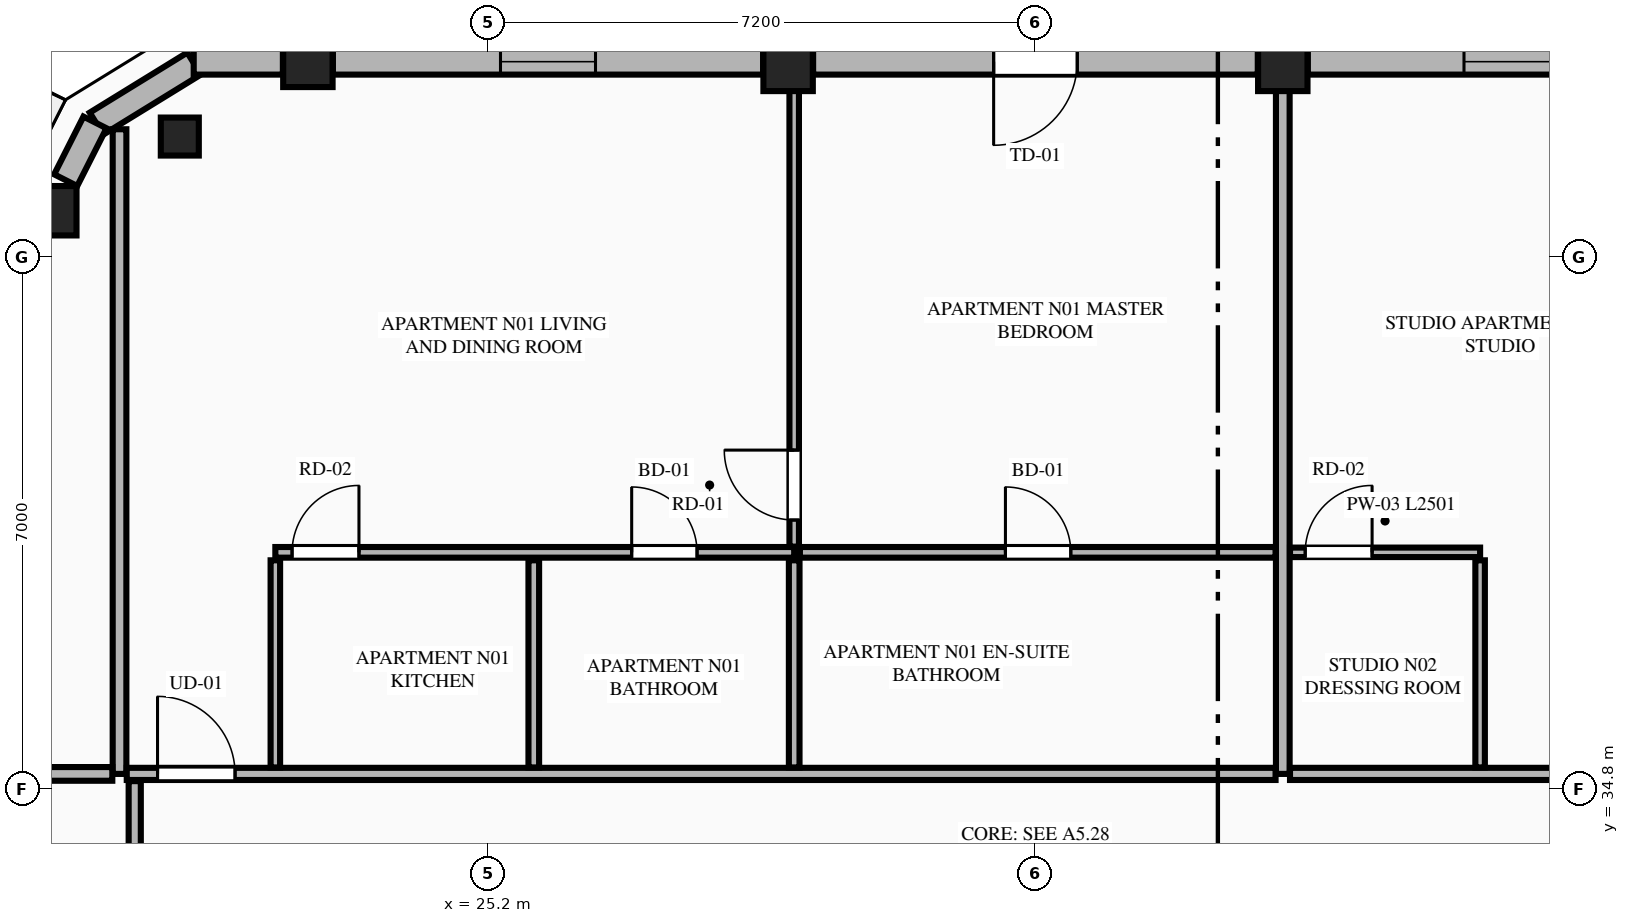
"""IFC4 building model, lengths in metres.
Left out: names, types, materials, properties, quantities, classifications, styles, units other than length and angle.
Written with IfcOpenShell. Run it as: python <this file> out.ifc"""

import sys

from ifc_helpers import new_model, si_unit, direction, frame, frame_2d, origin, origin_2d, place, context, subcontext, project, spatial, rectangle, extrude, element, fill, save


model = new_model("IFC4")
c1 = context("Model", 3, precision=1e-05, world=origin(), true_north=direction((0.0, 1.0)))
c2 = subcontext(c1, "Body", "Model", "MODEL_VIEW")
j1 = project(units=[si_unit("LENGTHUNIT", "METRE"), si_unit("PLANEANGLEUNIT", "RADIAN")], contexts=[c1])
p1 = place(None, origin())
s1 = spatial("IfcSite", under=j1, at=p1, CompositionType="ELEMENT")
p2 = place(p1, origin())
s2 = spatial("IfcBuilding", under=s1, at=p2, CompositionType="ELEMENT")
p3 = place(p2, frame((0.0, 0.0, 270.8)))
s3 = spatial("IfcBuildingStorey", under=s2, at=p3, CompositionType="ELEMENT", Elevation=270.8)
for number, where, z_axis, x_axis in (
    (1, (35.654, 44.308, 0.0), (0.0, 0.0, 1.0), (1.0, 0.0, 0.0)),
    (2, (29.146, 44.308, 0.0), (0.0, 0.0, 1.0), (1.0, 0.0, 0.0)),
    (3, (22.828, 44.361, 0.0), (0.0, 0.0, 1.0), (1.0, 0.0, 0.0)),
    (4, (19.459, 42.409, 0.0), (0.0, 0.0, 1.0), (1.0, 0.0, 0.0)),
):
    element("IfcColumn", number, at=place(p3, frame(where, z_axis=z_axis, x_axis=x_axis)), inside=s3, PredefinedType="COLUMN", context=c2, shape_type="SweptSolid", body=[
        extrude(rectangle(XDim=0.65, YDim=0.65, at=origin_2d()), origin(), (0.0, 0.0, 1.0), 3.65),
    ])
p4 = place(p3, frame((21.143, 43.385, 0.0), z_axis=(0.0, 0.0, 1.0), x_axis=(-0.865256437757, -0.501329529272, 0.0)))
e5 = element("IfcColumn", 5, at=p4, inside=s3, PredefinedType="PILASTER", context=c2, shape_type="SweptSolid", body=[
    extrude(rectangle(XDim=0.5, YDim=0.35, at=origin_2d()), origin(), (0.0, 0.0, 1.0), 3.65),
])
p5 = place(p3, frame((21.331, 44.345, 0.0), z_axis=(0.0, 0.0, 1.0), x_axis=(-0.851680557619, -0.52406128246, 0.0)))
e6 = element("IfcWall", 6, at=p5, inside=s3, PredefinedType="STANDARD", context=c2, shape_type="SweptSolid", body=[
    extrude(rectangle(XDim=1.508, YDim=0.34, at=frame_2d((0.754, 0.0))), origin(), (0.0, 0.0, 1.0), 3.45),
])
p6 = place(p3, frame((41.643, 44.37, 0.0), z_axis=(0.0, 0.0, 1.0), x_axis=(-1.0, 0.0, 0.0)))
e7 = element("IfcWall", 7, at=p6, inside=s3, PredefinedType="STANDARD", context=c2, shape_type="SweptSolid", body=[
    extrude(rectangle(XDim=5.66, YDim=0.34, at=frame_2d((2.83, 0.0))), origin(), (0.0, 0.0, 1.0), 2.983),
])
p7 = place(p6, frame((2.055, 0.0, 0.75)))
e8 = element("IfcOpeningElement", 8, at=p7, cuts=e7, PredefinedType="OPENING", context=c2, shape_type="SweptSolid", body=[
    extrude(rectangle(XDim=1.55, YDim=2.05, at=frame_2d((0.775, 1.025))), frame((0.0, 0.18, 0.0), z_axis=(0.0, -1.0, 0.0), x_axis=(1.0, 0.0, 0.0)), (0.0, 0.0, 1.0), 0.36),
])
p8 = place(p3, frame((35.325, 44.37, 0.0), z_axis=(0.0, 0.0, 1.0), x_axis=(-1.0, 0.0, 0.0)))
e9 = element("IfcWall", 9, at=p8, inside=s3, PredefinedType="STANDARD", context=c2, shape_type="SweptSolid", body=[
    extrude(rectangle(XDim=5.85, YDim=0.34, at=frame_2d((2.925, 0.0))), origin(), (0.0, 0.0, 1.0), 2.983),
])
p9 = place(p8, frame((2.375, 0.0, 0.0)))
e10 = element("IfcOpeningElement", 10, at=p9, cuts=e9, PredefinedType="OPENING", context=c2, shape_type="SweptSolid", body=[
    extrude(rectangle(XDim=1.1, YDim=2.25, at=frame_2d((0.55, 1.125))), frame((0.0, 0.18, 0.0), z_axis=(0.0, -1.0, 0.0), x_axis=(1.0, 0.0, 0.0)), (0.0, 0.0, 1.0), 0.36),
])
p10 = place(p3, frame((28.817, 44.37, 0.0), z_axis=(0.0, 0.0, 1.0), x_axis=(-1.0, 0.0, 0.0)))
e11 = element("IfcWall", 11, at=p10, inside=s3, PredefinedType="STANDARD", context=c2, shape_type="SweptSolid", body=[
    extrude(rectangle(XDim=5.66, YDim=0.34, at=frame_2d((2.83, 0.0))), origin(), (0.0, 0.0, 1.0), 2.983),
])
p11 = place(p10, frame((2.205, 0.0, 0.75)))
e12 = element("IfcOpeningElement", 12, at=p11, cuts=e11, PredefinedType="OPENING", context=c2, shape_type="SweptSolid", body=[
    extrude(rectangle(XDim=1.25, YDim=1.95, at=frame_2d((0.625, 0.975))), frame((0.0, 0.18, 0.0), z_axis=(0.0, -1.0, 0.0), x_axis=(1.0, 0.0, 0.0)), (0.0, 0.0, 1.0), 0.36),
])
p12 = place(p3, frame((22.499, 44.37, 0.0), z_axis=(0.0, 0.0, 1.0), x_axis=(-1.0, 0.0, 0.0)))
e13 = element("IfcWall", 13, at=p12, inside=s3, PredefinedType="STANDARD", context=c2, shape_type="SweptSolid", body=[
    extrude(rectangle(XDim=1.173, YDim=0.34, at=frame_2d((0.586, 0.0))), origin(), (0.0, 0.0, 1.0), 3.45),
])
p13 = place(p3, frame((20.027, 43.571, 0.0), z_axis=(0.0, 0.0, 1.0), x_axis=(-0.451907025977, -0.8920650424, 0.0)))
e14 = element("IfcWall", 14, at=p13, inside=s3, PredefinedType="STANDARD", context=c2, shape_type="SweptSolid", body=[
    extrude(rectangle(XDim=0.852, YDim=0.34, at=frame_2d((0.426, 0.0))), origin(), (0.0, 0.0, 1.0), 3.45),
])
p14 = place(p3, frame((20.35, 35.0, 0.0), z_axis=(0.0, 0.0, 1.0), x_axis=(0.0, 1.0, 0.0)))
e15 = element("IfcWall", 15, at=p14, inside=s3, PredefinedType="PARTITIONING", context=c2, shape_type="SweptSolid", body=[
    extrude(rectangle(XDim=8.481, YDim=0.18, at=frame_2d((4.24, 0.0))), origin(), (0.0, 0.0, 1.0), 3.45),
])
p15 = place(p3, frame((35.654, 35.0, 0.0), z_axis=(0.0, 0.0, 1.0), x_axis=(0.0, 1.0, 0.0)))
e16 = element("IfcWall", 16, at=p15, inside=s3, PredefinedType="PARTITIONING", context=c2, shape_type="SweptSolid", body=[
    extrude(rectangle(XDim=9.195, YDim=0.18, at=frame_2d((4.598, 0.0))), origin(), (0.0, 0.0, 1.0), 2.907),
])
p16 = place(p3, frame((20.445, 35.0, 0.0), z_axis=(0.0, 0.0, 1.0), x_axis=(1.0, 0.0, 0.0)))
e17 = element("IfcWall", 17, at=p16, inside=s3, PredefinedType="PARTITIONING", context=c2, shape_type="SweptSolid", body=[
    extrude(rectangle(XDim=15.114, YDim=0.16, at=frame_2d((7.557, 0.0))), origin(), (0.0, 0.0, 1.0), 3.45),
])
p17 = place(p16, frame((0.405, 0.0, 0.0)))
e18 = element("IfcOpeningElement", 18, at=p17, cuts=e17, PredefinedType="OPENING", context=c2, shape_type="SweptSolid", body=[
    extrude(rectangle(XDim=1.02, YDim=2.25, at=frame_2d((0.51, 1.125))), frame((0.0, 0.09, 0.0), z_axis=(0.0, -1.0, 0.0), x_axis=(1.0, 0.0, 0.0)), (0.0, 0.0, 1.0), 0.18),
])
p18 = place(p3, frame((22.4, 35.085, 0.0), z_axis=(0.0, 0.0, 1.0), x_axis=(0.0, 1.0, 0.0)))
e19 = element("IfcWall", 19, at=p18, inside=s3, PredefinedType="PARTITIONING", context=c2, shape_type="SweptSolid", body=[
    extrude(rectangle(XDim=2.725, YDim=0.125, at=frame_2d((1.363, 0.0))), origin(), (0.0, 0.0, 1.0), 3.45),
])
p19 = place(p3, frame((22.4, 37.915, 0.0), z_axis=(0.0, 0.0, 1.0), x_axis=(1.0, 0.0, 0.0)))
e20 = element("IfcWall", 20, at=p19, inside=s3, PredefinedType="PLUMBINGWALL", context=c2, shape_type="SweptSolid", body=[
    extrude(rectangle(XDim=6.826, YDim=0.14, at=frame_2d((3.413, 0.0))), origin(), (0.0, 0.0, 1.0), 3.45),
])
p20 = place(p19, frame((4.688, 0.0, 0.0)))
e21 = element("IfcOpeningElement", 21, at=p20, cuts=e20, PredefinedType="OPENING", context=c2, shape_type="SweptSolid", body=[
    extrude(rectangle(XDim=0.86, YDim=2.1, at=frame_2d((0.43, 1.05))), frame((0.0, 0.08, 0.0), z_axis=(0.0, -1.0, 0.0), x_axis=(1.0, 0.0, 0.0)), (0.0, 0.0, 1.0), 0.16),
])
p21 = place(p19, frame((0.22, 0.0, 0.0)))
e22 = element("IfcOpeningElement", 22, at=p21, cuts=e20, PredefinedType="OPENING", context=c2, shape_type="SweptSolid", body=[
    extrude(rectangle(XDim=0.88, YDim=2.15, at=frame_2d((0.44, 1.075))), frame((0.0, 0.08, 0.0), z_axis=(0.0, -1.0, 0.0), x_axis=(1.0, 0.0, 0.0)), (0.0, 0.0, 1.0), 0.16),
])
p22 = place(p3, frame((29.301, 37.915, 0.0), z_axis=(0.0, 0.0, 1.0), x_axis=(1.0, 0.0, 0.0)))
e23 = element("IfcWall", 23, at=p22, inside=s3, PredefinedType="PLUMBINGWALL", context=c2, shape_type="SweptSolid", body=[
    extrude(rectangle(XDim=6.258, YDim=0.14, at=frame_2d((3.129, 0.0))), origin(), (0.0, 0.0, 1.0), 3.45),
])
p23 = place(p22, frame((2.704, 0.0, 0.0)))
e24 = element("IfcOpeningElement", 24, at=p23, cuts=e23, PredefinedType="OPENING", context=c2, shape_type="SweptSolid", body=[
    extrude(rectangle(XDim=0.86, YDim=2.1, at=frame_2d((0.43, 1.05))), frame((0.0, 0.08, 0.0), z_axis=(0.0, -1.0, 0.0), x_axis=(1.0, 0.0, 0.0)), (0.0, 0.0, 1.0), 0.16),
])
p24 = place(p3, frame((25.8, 35.085, 0.0), z_axis=(0.0, 0.0, 1.0), x_axis=(0.0, 1.0, 0.0)))
e25 = element("IfcWall", 25, at=p24, inside=s3, PredefinedType="PLUMBINGWALL", context=c2, shape_type="SweptSolid", body=[
    extrude(rectangle(XDim=2.725, YDim=0.14, at=frame_2d((1.363, 0.0))), origin(), (0.0, 0.0, 1.0), 3.45),
])
p25 = place(p3, frame((29.226, 35.085, 0.0), z_axis=(0.0, 0.0, 1.0), x_axis=(0.0, 1.0, 0.0)))
e26 = element("IfcWall", 26, at=p25, inside=s3, PredefinedType="PLUMBINGWALL", context=c2, shape_type="SweptSolid", body=[
    extrude(rectangle(XDim=2.725, YDim=0.14, at=frame_2d((1.363, 0.0))), origin(), (0.0, 0.0, 1.0), 2.907),
])
p26 = place(p3, frame((29.226, 37.99, 0.0), z_axis=(0.0, 0.0, 1.0), x_axis=(0.0, 1.0, 0.0)))
e27 = element("IfcWall", 27, at=p26, inside=s3, PredefinedType="PARTITIONING", context=c2, shape_type="SweptSolid", body=[
    extrude(rectangle(XDim=6.295, YDim=0.125, at=frame_2d((3.147, 0.0))), origin(), (0.0, 0.0, 1.0), 2.907),
])
p27 = place(p26, frame((0.35, 0.0, 0.0)))
e28 = element("IfcOpeningElement", 28, at=p27, cuts=e27, PredefinedType="OPENING", context=c2, shape_type="SweptSolid", body=[
    extrude(rectangle(XDim=0.92, YDim=2.15, at=frame_2d((0.46, 1.075))), frame((0.0, 0.073, 0.0), z_axis=(0.0, -1.0, 0.0), x_axis=(1.0, 0.0, 0.0)), (0.0, 0.0, 1.0), 0.145),
])
p28 = place(p3, frame((35.749, 35.0, 0.0), z_axis=(0.0, 0.0, 1.0), x_axis=(1.0, 0.0, 0.0)))
e29 = element("IfcWall", 29, at=p28, inside=s3, PredefinedType="PARTITIONING", context=c2, shape_type="SweptSolid", body=[
    extrude(rectangle(XDim=8.606, YDim=0.16, at=frame_2d((4.303, 0.0))), origin(), (0.0, 0.0, 1.0), 3.45),
])
p29 = place(p28, frame((6.351, 0.0, 0.0)))
e30 = element("IfcOpeningElement", 30, at=p29, cuts=e29, PredefinedType="OPENING", context=c2, shape_type="SweptSolid", body=[
    extrude(rectangle(XDim=1.02, YDim=2.25, at=frame_2d((0.51, 1.125))), frame((0.0, 0.09, 0.0), z_axis=(0.0, -1.0, 0.0), x_axis=(1.0, 0.0, 0.0)), (0.0, 0.0, 1.0), 0.18),
])
p30 = place(p3, frame((38.25, 35.085, 0.0), z_axis=(0.0, 0.0, 1.0), x_axis=(0.0, 1.0, 0.0)))
e31 = element("IfcWall", 31, at=p30, inside=s3, PredefinedType="PARTITIONING", context=c2, shape_type="SweptSolid", body=[
    extrude(rectangle(XDim=2.725, YDim=0.125, at=frame_2d((1.363, 0.0))), origin(), (0.0, 0.0, 1.0), 3.45),
])
p31 = place(p3, frame((35.749, 37.915, 0.0), z_axis=(0.0, 0.0, 1.0), x_axis=(1.0, 0.0, 0.0)))
e32 = element("IfcWall", 32, at=p31, inside=s3, PredefinedType="PARTITIONING", context=c2, shape_type="SweptSolid", body=[
    extrude(rectangle(XDim=2.501, YDim=0.125, at=frame_2d((1.25, 0.0))), origin(), (0.0, 0.0, 1.0), 3.45),
])
p32 = place(p31, frame((0.2, 0.0, 0.0)))
e33 = element("IfcOpeningElement", 33, at=p32, cuts=e32, PredefinedType="OPENING", context=c2, shape_type="SweptSolid", body=[
    extrude(rectangle(XDim=0.88, YDim=2.15, at=frame_2d((0.44, 1.075))), frame((0.0, 0.073, 0.0), z_axis=(0.0, -1.0, 0.0), x_axis=(1.0, 0.0, 0.0)), (0.0, 0.0, 1.0), 0.145),
])
p33 = place(p3, frame((15.933, 35.0, 0.0), z_axis=(0.0, 0.0, 1.0), x_axis=(1.0, 0.0, 0.0)))
e34 = element("IfcWall", 34, at=p33, inside=s3, PredefinedType="PARTITIONING", context=c2, shape_type="SweptSolid", body=[
    extrude(rectangle(XDim=4.322, YDim=0.18, at=frame_2d((2.161, 0.0))), origin(), (0.0, 0.0, 1.0), 3.45),
])
p34 = place(p3, frame((20.55, 16.495, 0.0), z_axis=(0.0, 0.0, 1.0), x_axis=(0.0, 1.0, 0.0)))
e35 = element("IfcWall", 35, at=p34, inside=s3, PredefinedType="PARTITIONING", context=c2, shape_type="SweptSolid", body=[
    extrude(rectangle(XDim=18.41, YDim=0.16, at=frame_2d((9.205, 0.0))), origin(), (0.0, 0.0, 1.0), 3.137),
])
p35 = place(p34, frame((0.45, 0.0, 0.0)))
e36 = element("IfcOpeningElement", 36, at=p35, cuts=e35, PredefinedType="OPENING", context=c2, shape_type="SweptSolid", body=[
    extrude(rectangle(XDim=1.02, YDim=2.25, at=frame_2d((0.51, 1.125))), frame((0.0, 0.09, 0.0), z_axis=(0.0, -1.0, 0.0), x_axis=(1.0, 0.0, 0.0)), (0.0, 0.0, 1.0), 0.18),
])
p36 = place(p7, origin())
e37 = element("IfcWindow", 37, at=p36, inside=s3, PartitioningType="SINGLE_PANEL", PredefinedType="WINDOW", context=c2, shape_type="SweptSolid", body=[
    extrude(rectangle(XDim=1.55, YDim=2.05, at=frame_2d((0.775, 1.025))), frame((0.0, 0.03, 0.0), z_axis=(0.0, -1.0, 0.0), x_axis=(1.0, 0.0, 0.0)), (0.0, 0.0, 1.0), 0.06),
])
fill(e8, e37)
p37 = place(p9, origin())
e38 = element("IfcDoor", 38, at=p37, inside=s3, OperationType="SINGLE_SWING_RIGHT", PredefinedType="DOOR", context=c2, shape_type="SweptSolid", body=[
    extrude(rectangle(XDim=1.1, YDim=2.25, at=frame_2d((0.55, 1.125))), frame((0.0, 0.025, 0.0), z_axis=(0.0, -1.0, 0.0), x_axis=(1.0, 0.0, 0.0)), (0.0, 0.0, 1.0), 0.05),
])
fill(e10, e38)
p38 = place(p11, origin())
e39 = element("IfcWindow", 39, at=p38, inside=s3, PartitioningType="SINGLE_PANEL", PredefinedType="WINDOW", context=c2, shape_type="SweptSolid", body=[
    extrude(rectangle(XDim=1.25, YDim=1.95, at=frame_2d((0.625, 0.975))), frame((0.0, 0.03, 0.0), z_axis=(0.0, -1.0, 0.0), x_axis=(1.0, 0.0, 0.0)), (0.0, 0.0, 1.0), 0.06),
])
fill(e12, e39)
p39 = place(p20, origin())
e40 = element("IfcDoor", 40, at=p39, inside=s3, OperationType="SINGLE_SWING_LEFT", PredefinedType="DOOR", context=c2, shape_type="SweptSolid", body=[
    extrude(rectangle(XDim=0.86, YDim=2.1, at=frame_2d((0.43, 1.05))), frame((0.0, 0.025, 0.0), z_axis=(0.0, -1.0, 0.0), x_axis=(1.0, 0.0, 0.0)), (0.0, 0.0, 1.0), 0.05),
])
fill(e21, e40)
p40 = place(p23, origin())
e41 = element("IfcDoor", 41, at=p40, inside=s3, OperationType="SINGLE_SWING_LEFT", PredefinedType="DOOR", context=c2, shape_type="SweptSolid", body=[
    extrude(rectangle(XDim=0.86, YDim=2.1, at=frame_2d((0.43, 1.05))), frame((0.0, 0.025, 0.0), z_axis=(0.0, -1.0, 0.0), x_axis=(1.0, 0.0, 0.0)), (0.0, 0.0, 1.0), 0.05),
])
fill(e24, e41)
p41 = place(p17, origin())
e42 = element("IfcDoor", 42, at=p41, inside=s3, OperationType="SINGLE_SWING_LEFT", PredefinedType="DOOR", context=c2, shape_type="SweptSolid", body=[
    extrude(rectangle(XDim=1.02, YDim=2.25, at=frame_2d((0.51, 1.125))), frame((0.0, 0.025, 0.0), z_axis=(0.0, -1.0, 0.0), x_axis=(1.0, 0.0, 0.0)), (0.0, 0.0, 1.0), 0.05),
])
fill(e18, e42)
p42 = place(p21, origin())
e43 = element("IfcDoor", 43, at=p42, inside=s3, OperationType="SINGLE_SWING_RIGHT", PredefinedType="DOOR", context=c2, shape_type="SweptSolid", body=[
    extrude(rectangle(XDim=0.88, YDim=2.15, at=frame_2d((0.44, 1.075))), frame((0.0, 0.025, 0.0), z_axis=(0.0, -1.0, 0.0), x_axis=(1.0, 0.0, 0.0)), (0.0, 0.0, 1.0), 0.05),
])
fill(e22, e43)
p43 = place(p27, origin())
e44 = element("IfcDoor", 44, at=p43, inside=s3, OperationType="SINGLE_SWING_RIGHT", PredefinedType="DOOR", context=c2, shape_type="SweptSolid", body=[
    extrude(rectangle(XDim=0.92, YDim=2.15, at=frame_2d((0.46, 1.075))), frame((0.0, 0.025, 0.0), z_axis=(0.0, -1.0, 0.0), x_axis=(1.0, 0.0, 0.0)), (0.0, 0.0, 1.0), 0.05),
])
fill(e28, e44)
p44 = place(p32, origin())
e45 = element("IfcDoor", 45, at=p44, inside=s3, OperationType="SINGLE_SWING_RIGHT", PredefinedType="DOOR", context=c2, shape_type="SweptSolid", body=[
    extrude(rectangle(XDim=0.88, YDim=2.15, at=frame_2d((0.44, 1.075))), frame((0.0, 0.025, 0.0), z_axis=(0.0, -1.0, 0.0), x_axis=(1.0, 0.0, 0.0)), (0.0, 0.0, 1.0), 0.05),
])
fill(e33, e45)
save(model, sys.argv[1])
